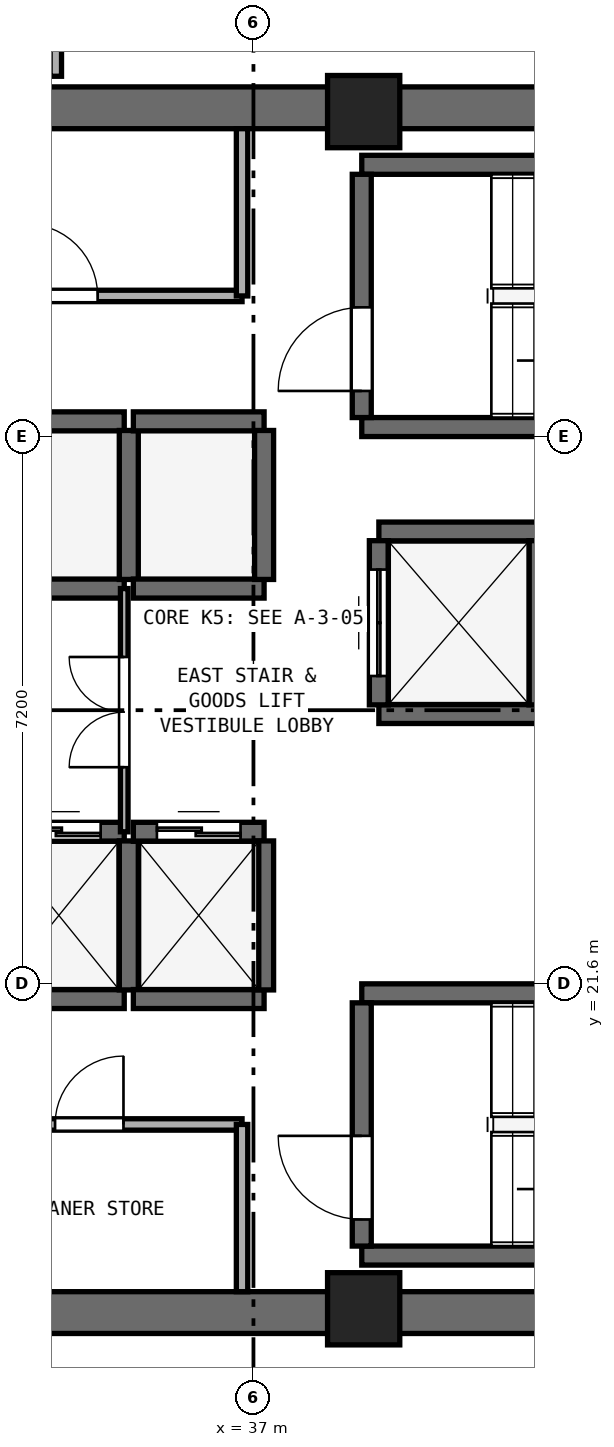
"""IFC4 building model, lengths in metres.
Left out: names, types, materials, properties, quantities, classifications, styles, units other than length and angle.
Written with IfcOpenShell. Run it as: python <this file> out.ifc"""

import sys

from ifc_helpers import new_model, si_unit, direction, frame, frame_2d, origin, origin_2d, place, context, subcontext, project, spatial, rectangle, extrude, element, fill, save


model = new_model("IFC4")
c1 = context("Model", 3, precision=1e-05, world=origin(), true_north=direction((0.0, 1.0)))
c2 = subcontext(c1, "Body", "Model", "MODEL_VIEW")
j1 = project(units=[si_unit("LENGTHUNIT", "METRE"), si_unit("PLANEANGLEUNIT", "RADIAN")], contexts=[c1])
p1 = place(None, origin())
s1 = spatial("IfcSite", under=j1, at=p1, CompositionType="ELEMENT")
p2 = place(p1, origin())
s2 = spatial("IfcBuilding", under=s1, at=p2, CompositionType="ELEMENT")
p3 = place(p2, frame((0.0, 0.0, 216.2)))
s3 = spatial("IfcBuildingStorey", under=s2, at=p3, CompositionType="ELEMENT", Elevation=216.2)
for number, where, z_axis, x_axis in (
    (1, (25.4, 17.275, 0.0), (0.0, 0.0, 1.0), (1.0, 0.0, 0.0)),
    (2, (25.4, 33.125, 0.0), (0.0, 0.0, 1.0), (1.0, 0.0, 0.0)),
):
    element("IfcWall", number, at=place(p3, frame(where, z_axis=z_axis, x_axis=x_axis)), inside=s3, PredefinedType="SHEAR", context=c2, shape_type="SweptSolid", body=[
        extrude(rectangle(XDim=23.2, YDim=0.55, at=frame_2d((11.6, 0.0))), origin(), (0.0, 0.0, 1.0), 3.4),
    ])
for number, where, z_axis, x_axis in (
    (3, (38.45, 17.325, 0.0), (0.0, 0.0, 1.0), (1.0, 0.0, 0.0)),
    (4, (38.45, 33.075, 0.0), (0.0, 0.0, 1.0), (1.0, 0.0, 0.0)),
):
    element("IfcColumn", number, at=place(p3, frame(where, z_axis=z_axis, x_axis=x_axis)), inside=s3, PredefinedType="PILASTER", context=c2, shape_type="SweptSolid", body=[
        extrude(rectangle(XDim=0.95, YDim=0.95, at=origin_2d()), origin(), (0.0, 0.0, 1.0), 3.8),
    ])
for number, where, z_axis, x_axis in (
    (5, (38.425, 28.925, 0.0), (0.0, 0.0, 1.0), (1.0, 0.0, 0.0)),
    (6, (38.425, 32.375, 0.0), (0.0, 0.0, 1.0), (1.0, 0.0, 0.0)),
):
    element("IfcWall", number, at=place(p3, frame(where, z_axis=z_axis, x_axis=x_axis)), inside=s3, PredefinedType="SHEAR", context=c2, shape_type="SweptSolid", body=[
        extrude(rectangle(XDim=7.3, YDim=0.25, at=frame_2d((3.65, 0.0))), origin(), (0.0, 0.0, 1.0), 3.4),
    ])
p4 = place(p3, frame((38.425, 29.05, 0.0), z_axis=(0.0, 0.0, 1.0), x_axis=(0.0, 1.0, 0.0)))
e7 = element("IfcWall", 7, at=p4, inside=s3, PredefinedType="SHEAR", context=c2, shape_type="SweptSolid", body=[
    extrude(rectangle(XDim=3.2, YDim=0.25, at=frame_2d((1.6, 0.0))), origin(), (0.0, 0.0, 1.0), 3.4),
])
p5 = place(p4, frame((0.35, 0.0, 0.0)))
e8 = element("IfcOpeningElement", 8, at=p5, cuts=e7, PredefinedType="OPENING", context=c2, shape_type="SweptSolid", body=[
    extrude(rectangle(XDim=1.1, YDim=2.15, at=frame_2d((0.55, 1.075))), frame((0.0, 0.135, 0.0), z_axis=(0.0, -1.0, 0.0), x_axis=(1.0, 0.0, 0.0)), (0.0, 0.0, 1.0), 0.27),
])
for number, where, z_axis, x_axis in (
    (9, (38.425, 18.025, 0.0), (0.0, 0.0, 1.0), (1.0, 0.0, 0.0)),
    (10, (38.425, 21.475, 0.0), (0.0, 0.0, 1.0), (1.0, 0.0, 0.0)),
):
    element("IfcWall", number, at=place(p3, frame(where, z_axis=z_axis, x_axis=x_axis)), inside=s3, PredefinedType="SHEAR", context=c2, shape_type="SweptSolid", body=[
        extrude(rectangle(XDim=7.3, YDim=0.25, at=frame_2d((3.65, 0.0))), origin(), (0.0, 0.0, 1.0), 3.4),
    ])
p6 = place(p3, frame((38.425, 18.15, 0.0), z_axis=(0.0, 0.0, 1.0), x_axis=(0.0, 1.0, 0.0)))
e11 = element("IfcWall", 11, at=p6, inside=s3, PredefinedType="SHEAR", context=c2, shape_type="SweptSolid", body=[
    extrude(rectangle(XDim=3.2, YDim=0.25, at=frame_2d((1.6, 0.0))), origin(), (0.0, 0.0, 1.0), 3.4),
])
p7 = place(p6, frame((0.35, 0.0, 0.0)))
e12 = element("IfcOpeningElement", 12, at=p7, cuts=e11, PredefinedType="OPENING", context=c2, shape_type="SweptSolid", body=[
    extrude(rectangle(XDim=1.1, YDim=2.15, at=frame_2d((0.55, 1.075))), frame((0.0, 0.135, 0.0), z_axis=(0.0, -1.0, 0.0), x_axis=(1.0, 0.0, 0.0)), (0.0, 0.0, 1.0), 0.27),
])
p8 = place(p3, frame((33.58, 21.4, 0.0), z_axis=(0.0, 0.0, 1.0), x_axis=(1.0, 0.0, 0.0)))
e13 = element("IfcWall", 13, at=p8, inside=s3, PredefinedType="SHEAR", context=c2, shape_type="SweptSolid", body=[
    extrude(rectangle(XDim=1.72, YDim=0.25, at=frame_2d((0.86, 0.0))), origin(), (0.0, 0.0, 1.0), 3.4),
])
p9 = place(p3, frame((33.58, 23.6, 0.0), z_axis=(0.0, 0.0, 1.0), x_axis=(1.0, 0.0, 0.0)))
e14 = element("IfcWall", 14, at=p9, inside=s3, PredefinedType="SHEAR", context=c2, shape_type="SweptSolid", body=[
    extrude(rectangle(XDim=1.72, YDim=0.25, at=frame_2d((0.86, 0.0))), origin(), (0.0, 0.0, 1.0), 3.4),
])
p10 = place(p9, frame((0.31, 0.0, 0.0)))
e15 = element("IfcOpeningElement", 15, at=p10, cuts=e14, PredefinedType="OPENING", context=c2, shape_type="SweptSolid", body=[
    extrude(rectangle(XDim=1.1, YDim=2.15, at=frame_2d((0.55, 1.075))), frame((0.0, 0.135, 0.0), z_axis=(0.0, -1.0, 0.0), x_axis=(1.0, 0.0, 0.0)), (0.0, 0.0, 1.0), 0.27),
])
p11 = place(p3, frame((35.36, 21.52, 0.0), z_axis=(0.0, 0.0, 1.0), x_axis=(0.0, 1.0, 0.0)))
e16 = element("IfcWall", 16, at=p11, inside=s3, PredefinedType="SHEAR", context=c2, shape_type="SweptSolid", body=[
    extrude(rectangle(XDim=1.96, YDim=0.25, at=frame_2d((0.98, 0.0))), origin(), (0.0, 0.0, 1.0), 3.4),
])
p12 = place(p3, frame((35.42, 21.4, 0.0), z_axis=(0.0, 0.0, 1.0), x_axis=(1.0, 0.0, 0.0)))
e17 = element("IfcWall", 17, at=p12, inside=s3, PredefinedType="SHEAR", context=c2, shape_type="SweptSolid", body=[
    extrude(rectangle(XDim=1.72, YDim=0.25, at=frame_2d((0.86, 0.0))), origin(), (0.0, 0.0, 1.0), 3.4),
])
p13 = place(p3, frame((35.42, 23.6, 0.0), z_axis=(0.0, 0.0, 1.0), x_axis=(1.0, 0.0, 0.0)))
e18 = element("IfcWall", 18, at=p13, inside=s3, PredefinedType="SHEAR", context=c2, shape_type="SweptSolid", body=[
    extrude(rectangle(XDim=1.72, YDim=0.25, at=frame_2d((0.86, 0.0))), origin(), (0.0, 0.0, 1.0), 3.4),
])
p14 = place(p13, frame((0.31, 0.0, 0.0)))
e19 = element("IfcOpeningElement", 19, at=p14, cuts=e18, PredefinedType="OPENING", context=c2, shape_type="SweptSolid", body=[
    extrude(rectangle(XDim=1.1, YDim=2.15, at=frame_2d((0.55, 1.075))), frame((0.0, 0.135, 0.0), z_axis=(0.0, -1.0, 0.0), x_axis=(1.0, 0.0, 0.0)), (0.0, 0.0, 1.0), 0.27),
])
p15 = place(p3, frame((37.14, 21.52, 0.0), z_axis=(0.0, 0.0, 1.0), x_axis=(0.0, 1.0, 0.0)))
e20 = element("IfcWall", 20, at=p15, inside=s3, PredefinedType="SHEAR", context=c2, shape_type="SweptSolid", body=[
    extrude(rectangle(XDim=1.96, YDim=0.25, at=frame_2d((0.98, 0.0))), origin(), (0.0, 0.0, 1.0), 3.4),
])
for number, where, z_axis, x_axis in (
    (21, (33.58, 26.8, 0.0), (0.0, 0.0, 1.0), (1.0, 0.0, 0.0)),
    (22, (33.58, 29.0, 0.0), (0.0, 0.0, 1.0), (1.0, 0.0, 0.0)),
):
    element("IfcWall", number, at=place(p3, frame(where, z_axis=z_axis, x_axis=x_axis)), inside=s3, PredefinedType="SHEAR", context=c2, shape_type="SweptSolid", body=[
        extrude(rectangle(XDim=1.72, YDim=0.25, at=frame_2d((0.86, 0.0))), origin(), (0.0, 0.0, 1.0), 3.4),
    ])
p16 = place(p3, frame((35.36, 26.92, 0.0), z_axis=(0.0, 0.0, 1.0), x_axis=(0.0, 1.0, 0.0)))
e23 = element("IfcWall", 23, at=p16, inside=s3, PredefinedType="SHEAR", context=c2, shape_type="SweptSolid", body=[
    extrude(rectangle(XDim=1.96, YDim=0.25, at=frame_2d((0.98, 0.0))), origin(), (0.0, 0.0, 1.0), 3.4),
])
for number, where, z_axis, x_axis in (
    (24, (35.42, 26.8, 0.0), (0.0, 0.0, 1.0), (1.0, 0.0, 0.0)),
    (25, (35.42, 29.0, 0.0), (0.0, 0.0, 1.0), (1.0, 0.0, 0.0)),
):
    element("IfcWall", number, at=place(p3, frame(where, z_axis=z_axis, x_axis=x_axis)), inside=s3, PredefinedType="SHEAR", context=c2, shape_type="SweptSolid", body=[
        extrude(rectangle(XDim=1.72, YDim=0.25, at=frame_2d((0.86, 0.0))), origin(), (0.0, 0.0, 1.0), 3.4),
    ])
p17 = place(p3, frame((37.14, 26.92, 0.0), z_axis=(0.0, 0.0, 1.0), x_axis=(0.0, 1.0, 0.0)))
e26 = element("IfcWall", 26, at=p17, inside=s3, PredefinedType="SHEAR", context=c2, shape_type="SweptSolid", body=[
    extrude(rectangle(XDim=1.96, YDim=0.25, at=frame_2d((0.98, 0.0))), origin(), (0.0, 0.0, 1.0), 3.4),
])
for number, where, z_axis, x_axis in (
    (27, (38.65, 25.15, 0.0), (0.0, 0.0, 1.0), (1.0, 0.0, 0.0)),
    (28, (38.65, 27.55, 0.0), (0.0, 0.0, 1.0), (1.0, 0.0, 0.0)),
):
    element("IfcWall", number, at=place(p3, frame(where, z_axis=z_axis, x_axis=x_axis)), inside=s3, PredefinedType="SHEAR", context=c2, shape_type="SweptSolid", body=[
        extrude(rectangle(XDim=2.1, YDim=0.25, at=frame_2d((1.05, 0.0))), origin(), (0.0, 0.0, 1.0), 3.4),
    ])
p18 = place(p3, frame((38.65, 25.27, 0.0), z_axis=(0.0, 0.0, 1.0), x_axis=(0.0, 1.0, 0.0)))
e29 = element("IfcWall", 29, at=p18, inside=s3, PredefinedType="SHEAR", context=c2, shape_type="SweptSolid", body=[
    extrude(rectangle(XDim=2.16, YDim=0.25, at=frame_2d((1.08, 0.0))), origin(), (0.0, 0.0, 1.0), 3.4),
])
p19 = place(p18, frame((0.38, 0.0, 0.0)))
e30 = element("IfcOpeningElement", 30, at=p19, cuts=e29, PredefinedType="OPENING", context=c2, shape_type="SweptSolid", body=[
    extrude(rectangle(XDim=1.4, YDim=2.2, at=frame_2d((0.7, 1.1))), frame((0.0, 0.135, 0.0), z_axis=(0.0, -1.0, 0.0), x_axis=(1.0, 0.0, 0.0)), (0.0, 0.0, 1.0), 0.27),
])
p20 = place(p3, frame((40.75, 25.27, 0.0), z_axis=(0.0, 0.0, 1.0), x_axis=(0.0, 1.0, 0.0)))
e31 = element("IfcWall", 31, at=p20, inside=s3, PredefinedType="SHEAR", context=c2, shape_type="SweptSolid", body=[
    extrude(rectangle(XDim=2.16, YDim=0.25, at=frame_2d((1.08, 0.0))), origin(), (0.0, 0.0, 1.0), 3.4),
])
p21 = place(p3, frame((32.1, 30.65, 0.0), z_axis=(0.0, 0.0, 1.0), x_axis=(1.0, 0.0, 0.0)))
e32 = element("IfcWall", 32, at=p21, inside=s3, PredefinedType="PARTITIONING", context=c2, shape_type="SweptSolid", body=[
    extrude(rectangle(XDim=4.75, YDim=0.15, at=frame_2d((2.375, 0.0))), origin(), (0.0, 0.0, 1.0), 3.4),
])
p22 = place(p21, frame((1.9, 0.0, 0.0)))
e33 = element("IfcOpeningElement", 33, at=p22, cuts=e32, PredefinedType="OPENING", context=c2, shape_type="SweptSolid", body=[
    extrude(rectangle(XDim=0.95, YDim=2.1, at=frame_2d((0.475, 1.05))), frame((0.0, 0.085, 0.0), z_axis=(0.0, -1.0, 0.0), x_axis=(1.0, 0.0, 0.0)), (0.0, 0.0, 1.0), 0.17),
])
p23 = place(p3, frame((36.85, 30.65, 0.0), z_axis=(0.0, 0.0, 1.0), x_axis=(0.0, 1.0, 0.0)))
e34 = element("IfcWall", 34, at=p23, inside=s3, PredefinedType="PARTITIONING", context=c2, shape_type="SweptSolid", body=[
    extrude(rectangle(XDim=2.2, YDim=0.15, at=frame_2d((1.1, 0.0))), origin(), (0.0, 0.0, 1.0), 3.4),
])
p24 = place(p3, frame((32.83, 19.75, 0.0), z_axis=(0.0, 0.0, 1.0), x_axis=(1.0, 0.0, 0.0)))
e35 = element("IfcWall", 35, at=p24, inside=s3, PredefinedType="PARTITIONING", context=c2, shape_type="SweptSolid", body=[
    extrude(rectangle(XDim=4.02, YDim=0.15, at=frame_2d((2.01, 0.0))), origin(), (0.0, 0.0, 1.0), 3.4),
])
p25 = place(p24, frame((1.56, 0.0, 0.0)))
e36 = element("IfcOpeningElement", 36, at=p25, cuts=e35, PredefinedType="OPENING", context=c2, shape_type="SweptSolid", body=[
    extrude(rectangle(XDim=0.9, YDim=2.1, at=frame_2d((0.45, 1.05))), frame((0.0, 0.085, 0.0), z_axis=(0.0, -1.0, 0.0), x_axis=(1.0, 0.0, 0.0)), (0.0, 0.0, 1.0), 0.17),
])
p26 = place(p3, frame((36.85, 17.55, 0.0), z_axis=(0.0, 0.0, 1.0), x_axis=(0.0, 1.0, 0.0)))
e37 = element("IfcWall", 37, at=p26, inside=s3, PredefinedType="PARTITIONING", context=c2, shape_type="SweptSolid", body=[
    extrude(rectangle(XDim=2.2, YDim=0.15, at=frame_2d((1.1, 0.0))), origin(), (0.0, 0.0, 1.0), 3.4),
])
p27 = place(p3, frame((35.3, 23.6, 0.0), z_axis=(0.0, 0.0, 1.0), x_axis=(0.0, 1.0, 0.0)))
e38 = element("IfcWall", 38, at=p27, inside=s3, PredefinedType="PARTITIONING", context=c2, shape_type="SweptSolid", body=[
    extrude(rectangle(XDim=3.2, YDim=0.1, at=frame_2d((1.6, 0.0))), origin(), (0.0, 0.0, 1.0), 3.4),
])
p28 = place(p27, frame((0.85, 0.0, 0.0)))
e39 = element("IfcOpeningElement", 39, at=p28, cuts=e38, PredefinedType="OPENING", context=c2, shape_type="SweptSolid", body=[
    extrude(rectangle(XDim=1.45, YDim=2.12, at=frame_2d((0.725, 1.06))), frame((0.0, 0.06, 0.0), z_axis=(0.0, -1.0, 0.0), x_axis=(1.0, 0.0, 0.0)), (0.0, 0.0, 1.0), 0.12),
])
p29 = place(p3, frame((34.4, 33.54, 0.0), z_axis=(0.0, 0.0, 1.0), x_axis=(0.0, 1.0, 0.0)))
e40 = element("IfcWall", 40, at=p29, inside=s3, PredefinedType="PARTITIONING", context=c2, shape_type="SweptSolid", body=[
    extrude(rectangle(XDim=1.81, YDim=0.15, at=frame_2d((0.905, 0.0))), origin(), (0.0, 0.0, 1.0), 3.4),
])
p30 = place(p5, origin())
e41 = element("IfcDoor", 41, at=p30, inside=s3, OperationType="SINGLE_SWING_LEFT", PredefinedType="DOOR", context=c2, shape_type="SweptSolid", body=[
    extrude(rectangle(XDim=1.1, YDim=2.15, at=frame_2d((0.55, 1.075))), frame((0.0, 0.025, 0.0), z_axis=(0.0, -1.0, 0.0), x_axis=(1.0, 0.0, 0.0)), (0.0, 0.0, 1.0), 0.05),
])
fill(e8, e41)
p31 = place(p7, origin())
e42 = element("IfcDoor", 42, at=p31, inside=s3, OperationType="SINGLE_SWING_RIGHT", PredefinedType="DOOR", context=c2, shape_type="SweptSolid", body=[
    extrude(rectangle(XDim=1.1, YDim=2.15, at=frame_2d((0.55, 1.075))), frame((0.0, 0.025, 0.0), z_axis=(0.0, -1.0, 0.0), x_axis=(1.0, 0.0, 0.0)), (0.0, 0.0, 1.0), 0.05),
])
fill(e12, e42)
p32 = place(p10, origin())
e43 = element("IfcDoor", 43, at=p32, inside=s3, OperationType="DOUBLE_DOOR_SLIDING", PredefinedType="DOOR", context=c2, shape_type="SweptSolid", body=[
    extrude(rectangle(XDim=1.1, YDim=2.15, at=frame_2d((0.55, 1.075))), frame((0.0, 0.025, 0.0), z_axis=(0.0, -1.0, 0.0), x_axis=(1.0, 0.0, 0.0)), (0.0, 0.0, 1.0), 0.05),
])
fill(e15, e43)
p33 = place(p14, origin())
e44 = element("IfcDoor", 44, at=p33, inside=s3, OperationType="DOUBLE_DOOR_SLIDING", PredefinedType="DOOR", context=c2, shape_type="SweptSolid", body=[
    extrude(rectangle(XDim=1.1, YDim=2.15, at=frame_2d((0.55, 1.075))), frame((0.0, 0.025, 0.0), z_axis=(0.0, -1.0, 0.0), x_axis=(1.0, 0.0, 0.0)), (0.0, 0.0, 1.0), 0.05),
])
fill(e19, e44)
p34 = place(p19, origin())
e45 = element("IfcDoor", 45, at=p34, inside=s3, OperationType="DOUBLE_DOOR_SLIDING", PredefinedType="DOOR", context=c2, shape_type="SweptSolid", body=[
    extrude(rectangle(XDim=1.4, YDim=2.2, at=frame_2d((0.7, 1.1))), frame((0.0, 0.025, 0.0), z_axis=(0.0, -1.0, 0.0), x_axis=(1.0, 0.0, 0.0)), (0.0, 0.0, 1.0), 0.05),
])
fill(e30, e45)
p35 = place(p22, origin())
e46 = element("IfcDoor", 46, at=p35, inside=s3, OperationType="SINGLE_SWING_LEFT", PredefinedType="DOOR", context=c2, shape_type="SweptSolid", body=[
    extrude(rectangle(XDim=0.95, YDim=2.1, at=frame_2d((0.475, 1.05))), frame((0.0, 0.025, 0.0), z_axis=(0.0, -1.0, 0.0), x_axis=(1.0, 0.0, 0.0)), (0.0, 0.0, 1.0), 0.05),
])
fill(e33, e46)
p36 = place(p25, origin())
e47 = element("IfcDoor", 47, at=p36, inside=s3, OperationType="SINGLE_SWING_RIGHT", PredefinedType="DOOR", context=c2, shape_type="SweptSolid", body=[
    extrude(rectangle(XDim=0.9, YDim=2.1, at=frame_2d((0.45, 1.05))), frame((0.0, 0.025, 0.0), z_axis=(0.0, -1.0, 0.0), x_axis=(1.0, 0.0, 0.0)), (0.0, 0.0, 1.0), 0.05),
])
fill(e36, e47)
p37 = place(p28, origin())
e48 = element("IfcDoor", 48, at=p37, inside=s3, OperationType="DOUBLE_DOOR_SINGLE_SWING", PredefinedType="DOOR", context=c2, shape_type="SweptSolid", body=[
    extrude(rectangle(XDim=1.45, YDim=2.12, at=frame_2d((0.725, 1.06))), frame((0.0, 0.025, 0.0), z_axis=(0.0, -1.0, 0.0), x_axis=(1.0, 0.0, 0.0)), (0.0, 0.0, 1.0), 0.05),
])
fill(e39, e48)
save(model, sys.argv[1])
